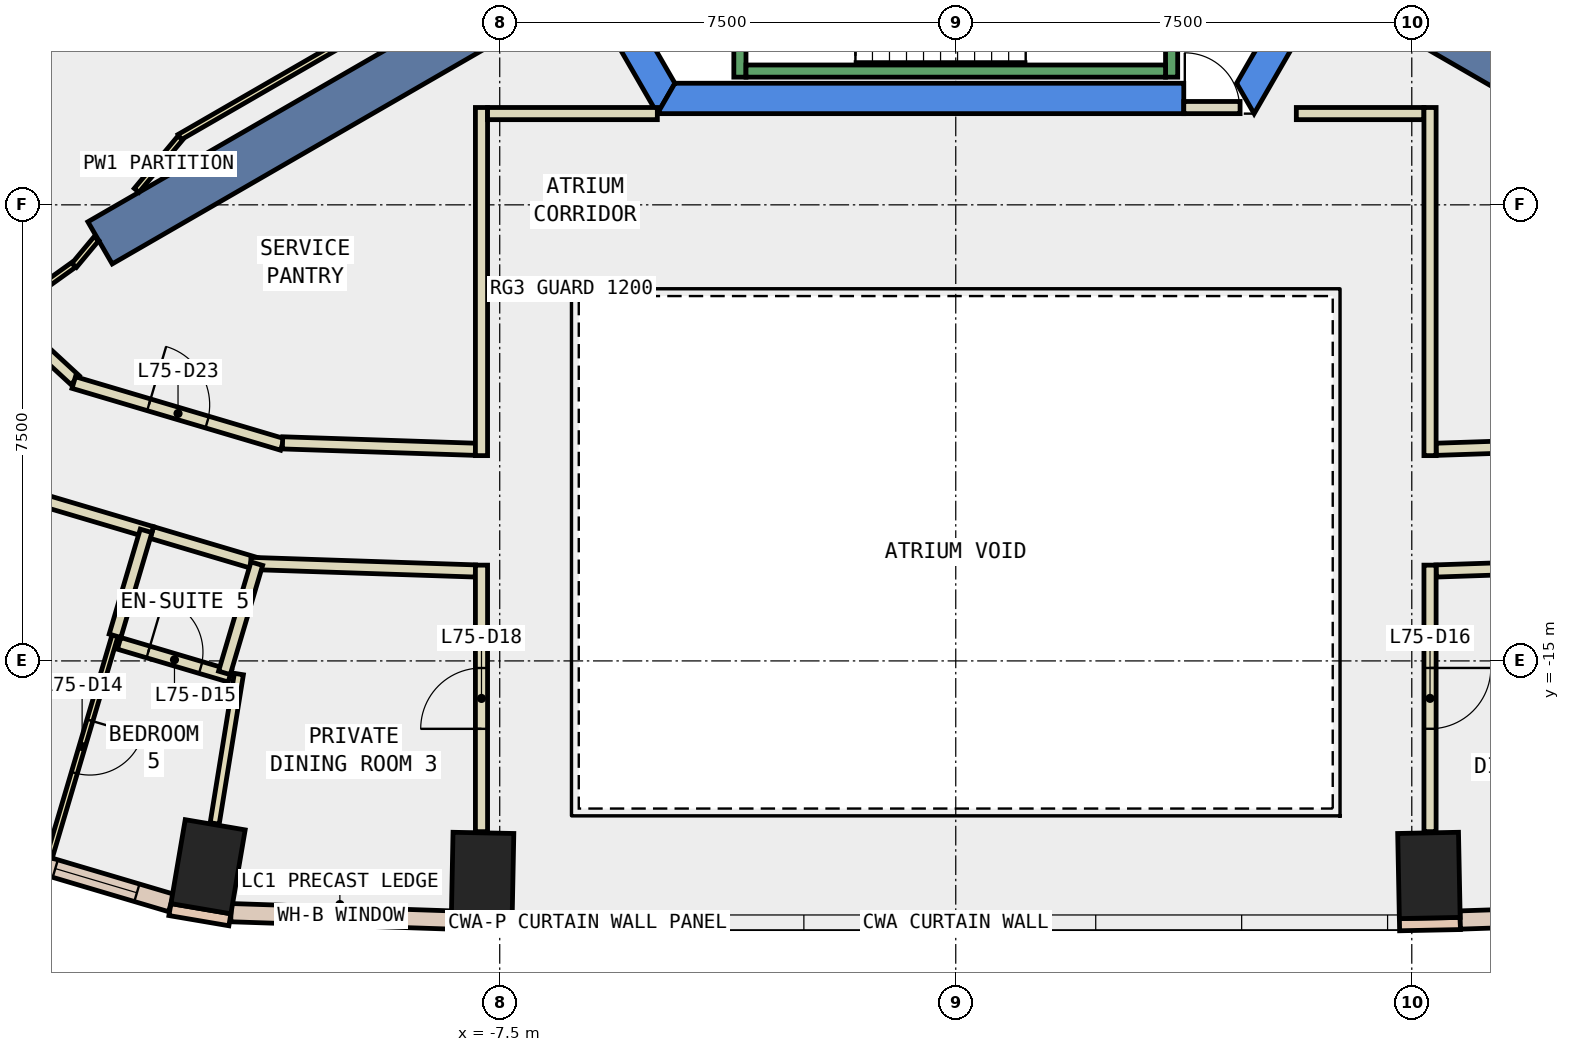
"""IFC4 building model, lengths in metres.
Left out: names, types, materials, properties, quantities, classifications, styles, units other than length and angle.
Written with IfcOpenShell. Run it as: python <this file> out.ifc"""

import sys

from ifc_helpers import new_model, si_unit, direction, frame, frame_2d, origin, origin_2d, place, context, subcontext, project, spatial, polyline, rectangle, outline, extrude, element, fill, save


model = new_model("IFC4")
c1 = context("Model", 3, precision=1e-05, world=origin(), true_north=direction((0.0, 1.0)))
c2 = subcontext(c1, "Body", "Model", "MODEL_VIEW")
j1 = project(units=[si_unit("LENGTHUNIT", "METRE"), si_unit("PLANEANGLEUNIT", "RADIAN")], contexts=[c1])
p1 = place(None, origin())
s1 = spatial("IfcSite", under=j1, at=p1, CompositionType="ELEMENT")
p2 = place(p1, origin())
s2 = spatial("IfcBuilding", under=s1, at=p2, CompositionType="ELEMENT")
p3 = place(p2, frame((0.0, 0.0, 318.8)))
s3 = spatial("IfcBuildingStorey", under=s2, at=p3, CompositionType="ELEMENT", Elevation=318.8)
for number, where, z_axis, x_axis in (
    (1, (-12.297, -18.385, -0.34), (0.0, 0.0, 1.0), (-0.986, 0.168, 0.0)),
    (2, (-7.782, -18.528, -0.34), (0.0, 0.0, 1.0), (-1.0, 0.02, 0.0)),
    (3, (7.782, -18.528, -0.34), (0.0, 0.0, 1.0), (1.0, 0.02, 0.0)),
):
    element("IfcColumn", number, at=place(p3, frame(where, z_axis=z_axis, x_axis=x_axis)), inside=s3, PredefinedType="COLUMN", context=c2, shape_type="SweptSolid", body=[
        extrude(rectangle(XDim=1.0, YDim=1.4, at=origin_2d()), origin(), (0.0, 0.0, 1.0), 3.6),
    ])
p4 = place(p3, frame((0.0, 0.0, -0.34)))
e4 = element("IfcWall", 4, at=p4, inside=s3, PredefinedType="SHEAR", context=c2, shape_type="SweptSolid", body=[
    extrude(outline(polyline([(-9.815, 2.5), (-4.907, -6.0), (-4.619, -5.5), (-9.238, 2.5), (-9.815, 2.5)])), origin(), (0.0, 0.0, 1.0), 3.6),
])
p5 = place(p3, frame((0.0, 0.0, -0.34)))
e5 = element("IfcWall", 5, at=p5, inside=s3, PredefinedType="SHEAR", context=c2, shape_type="SweptSolid", body=[
    extrude(outline(polyline([(3.75, -6.0), (3.75, -5.5), (-4.619, -5.5), (-4.907, -6.0), (3.75, -6.0)])), origin(), (0.0, 0.0, 1.0), 3.6),
])
p6 = place(p3, frame((0.0, 0.0, -0.34)))
e6 = element("IfcWall", 6, at=p6, inside=s3, PredefinedType="SHEAR", context=c2, shape_type="SweptSolid", body=[
    extrude(outline(polyline([(4.907, -6.0), (9.815, 2.5), (9.238, 2.5), (4.619, -5.5), (4.907, -6.0)])), origin(), (0.0, 0.0, 1.0), 3.6),
])
for number, where, z_axis, x_axis in (
    (7, (6.279, -3.625, -0.34), (0.0, 0.0, 1.0), (0.866, -0.5, 0.0)),
    (8, (-6.279, -3.625, -0.34), (0.0, 0.0, 1.0), (-0.866, -0.5, 0.0)),
):
    element("IfcWall", number, at=place(p3, frame(where, z_axis=z_axis, x_axis=x_axis)), inside=s3, PredefinedType="SHEAR", context=c2, shape_type="SweptSolid", body=[
        extrude(rectangle(XDim=9.0, YDim=0.8, at=frame_2d((4.5, 0.0))), origin(), (0.0, 0.0, 1.0), 3.6),
    ])
for number, where, z_axis, x_axis in (
    (9, (-12.924, -19.089, 0.0), (0.0, 0.0, 1.0), (0.986, -0.168, 0.0)),
    (10, (-8.298, -19.318, 0.0), (0.0, 0.0, 1.0), (1.0, -0.02, 0.0)),
    (11, (7.298, -19.338, 0.0), (0.0, 0.0, 1.0), (1.0, 0.02, 0.0)),
):
    element("IfcWall", number, at=place(p3, frame(where, z_axis=z_axis, x_axis=x_axis)), inside=s3, PredefinedType="STANDARD", context=c2, shape_type="SweptSolid", body=[
        extrude(rectangle(XDim=1.0, YDim=0.2, at=frame_2d((0.5, 0.0))), origin(), (0.0, 0.0, 1.0), 3.26),
    ])
p7 = place(p3, frame((-11.919, -19.14, 0.0), z_axis=(0.0, 0.0, 1.0), x_axis=(0.999441913039, -0.033404527552, 0.0)))
e12 = element("IfcWall", 12, at=p7, inside=s3, PredefinedType="STANDARD", context=c2, shape_type="SweptSolid", body=[
    extrude(rectangle(XDim=3.625, YDim=0.3, at=frame_2d((1.812, 0.0))), origin(), (0.0, 0.0, 1.0), 3.26),
])
p8 = place(p7, frame((1.113, 0.0, 0.9)))
e13 = element("IfcOpeningElement", 13, at=p8, cuts=e12, PredefinedType="OPENING", context=c2, shape_type="SweptSolid", body=[
    extrude(rectangle(XDim=1.4, YDim=2.0, at=frame_2d((0.7, 1.0))), frame((0.0, 0.16, 0.0), z_axis=(0.0, -1.0, 0.0), x_axis=(1.0, 0.0, 0.0)), (0.0, 0.0, 1.0), 0.32),
])
p9 = place(p3, frame((8.296, -19.261, 0.0), z_axis=(0.0, 0.0, 1.0), x_axis=(0.999441913039, 0.033404527552, 0.0)))
e14 = element("IfcWall", 14, at=p9, inside=s3, PredefinedType="STANDARD", context=c2, shape_type="SweptSolid", body=[
    extrude(rectangle(XDim=3.625, YDim=0.3, at=frame_2d((1.812, 0.0))), origin(), (0.0, 0.0, 1.0), 3.26),
])
p10 = place(p9, frame((1.113, 0.0, 0.9)))
e15 = element("IfcOpeningElement", 15, at=p10, cuts=e14, PredefinedType="OPENING", context=c2, shape_type="SweptSolid", body=[
    extrude(rectangle(XDim=1.4, YDim=2.0, at=frame_2d((0.7, 1.0))), frame((0.0, 0.16, 0.0), z_axis=(0.0, -1.0, 0.0), x_axis=(1.0, 0.0, 0.0)), (0.0, 0.0, 1.0), 0.32),
])
p11 = place(p3, frame((-17.842, -17.516, 0.0), z_axis=(0.0, 0.0, 1.0), x_axis=(0.958757933751, -0.284223898486, 0.0)))
e16 = element("IfcWall", 16, at=p11, inside=s3, PredefinedType="STANDARD", context=c2, shape_type="SweptSolid", body=[
    extrude(rectangle(XDim=5.15, YDim=0.3, at=frame_2d((2.575, 0.0))), origin(), (0.0, 0.0, 1.0), 3.26),
])
p12 = place(p11, frame((0.588, 0.0, 0.9)))
e17 = element("IfcOpeningElement", 17, at=p12, cuts=e16, PredefinedType="OPENING", context=c2, shape_type="SweptSolid", body=[
    extrude(rectangle(XDim=1.4, YDim=2.0, at=frame_2d((0.7, 1.0))), frame((0.0, 0.16, 0.0), z_axis=(0.0, -1.0, 0.0), x_axis=(1.0, 0.0, 0.0)), (0.0, 0.0, 1.0), 0.32),
])
p13 = place(p11, frame((3.163, 0.0, 0.9)))
e18 = element("IfcOpeningElement", 18, at=p13, cuts=e16, PredefinedType="OPENING", context=c2, shape_type="SweptSolid", body=[
    extrude(rectangle(XDim=1.4, YDim=2.0, at=frame_2d((0.7, 1.0))), frame((0.0, 0.16, 0.0), z_axis=(0.0, -1.0, 0.0), x_axis=(1.0, 0.0, 0.0)), (0.0, 0.0, 1.0), 0.32),
])
p14 = place(p3, frame((7.9, -11.52, 0.0), z_axis=(0.0, 0.0, 1.0), x_axis=(0.999442599499, 0.033383982774, 0.0)))
e19 = element("IfcWall", 19, at=p14, inside=s3, PredefinedType="PARTITIONING", context=c2, shape_type="SweptSolid", body=[
    extrude(rectangle(XDim=3.174, YDim=0.2, at=frame_2d((1.587, 0.0))), origin(), (0.0, 0.0, 1.0), 3.26),
])
p15 = place(p3, frame((-11.489, 1.942, 0.0), z_axis=(0.0, 0.0, 1.0), x_axis=(-0.475643534049, -0.879638123615, 0.0)))
e20 = element("IfcWall", 20, at=p15, inside=s3, PredefinedType="PARTITIONING", context=c2, shape_type="SweptSolid", body=[
    extrude(rectangle(XDim=7.871, YDim=0.2, at=frame_2d((3.936, 0.0))), origin(), (0.0, 0.0, 1.0), 3.26),
])
p16 = place(p15, frame((3.436, 0.0, 0.0)))
e21 = element("IfcOpeningElement", 21, at=p16, cuts=e20, PredefinedType="OPENING", context=c2, shape_type="SweptSolid", body=[
    extrude(rectangle(XDim=1.0, YDim=2.1, at=frame_2d((0.5, 1.05))), frame((0.0, 0.11, 0.0), z_axis=(0.0, -1.0, 0.0), x_axis=(1.0, 0.0, 0.0)), (0.0, 0.0, 1.0), 0.22),
])
p17 = place(p3, frame((-15.687, -9.272, 0.0), z_axis=(0.0, 0.0, 1.0), x_axis=(0.734946370973, -0.67812523312, 0.0)))
e22 = element("IfcWall", 22, at=p17, inside=s3, PredefinedType="PARTITIONING", context=c2, shape_type="SweptSolid", body=[
    extrude(rectangle(XDim=1.637, YDim=0.2, at=frame_2d((0.818, 0.0))), origin(), (0.0, 0.0, 1.0), 3.26),
])
p18 = place(p3, frame((-14.506, -10.422, 0.0), z_axis=(0.0, 0.0, 1.0), x_axis=(0.958760241353, -0.284216114252, 0.0)))
e23 = element("IfcWall", 23, at=p18, inside=s3, PredefinedType="PARTITIONING", context=c2, shape_type="SweptSolid", body=[
    extrude(rectangle(XDim=3.578, YDim=0.2, at=frame_2d((1.789, 0.0))), origin(), (0.0, 0.0, 1.0), 3.26),
])
p19 = place(p18, frame((1.289, 0.0, 0.0)))
e24 = element("IfcOpeningElement", 24, at=p19, cuts=e23, PredefinedType="OPENING", context=c2, shape_type="SweptSolid", body=[
    extrude(rectangle(XDim=1.0, YDim=2.1, at=frame_2d((0.5, 1.05))), frame((0.0, 0.11, 0.0), z_axis=(0.0, -1.0, 0.0), x_axis=(1.0, 0.0, 0.0)), (0.0, 0.0, 1.0), 0.22),
])
p20 = place(p3, frame((-11.072, -11.414, 0.0), z_axis=(0.0, 0.0, 1.0), x_axis=(0.999442599499, -0.033383982774, 0.0)))
e25 = element("IfcWall", 25, at=p20, inside=s3, PredefinedType="PARTITIONING", context=c2, shape_type="SweptSolid", body=[
    extrude(rectangle(XDim=3.174, YDim=0.2, at=frame_2d((1.587, 0.0))), origin(), (0.0, 0.0, 1.0), 3.26),
])
p21 = place(p3, frame((11.52, -13.4, 0.0), z_axis=(0.0, 0.0, 1.0), x_axis=(-0.999441010134, -0.033431530957, 0.0)))
e26 = element("IfcWall", 26, at=p21, inside=s3, PredefinedType="PARTITIONING", context=c2, shape_type="SweptSolid", body=[
    extrude(rectangle(XDim=3.622, YDim=0.2, at=frame_2d((1.811, 0.0))), origin(), (0.0, 0.0, 1.0), 3.26),
])
p22 = place(p3, frame((-13.22, -12.889, 0.0), z_axis=(0.0, 0.0, 1.0), x_axis=(-0.958789155152, 0.284118559693, 0.0)))
e27 = element("IfcWall", 27, at=p22, inside=s3, PredefinedType="PARTITIONING", context=c2, shape_type="SweptSolid", body=[
    extrude(rectangle(XDim=2.2, YDim=0.2, at=frame_2d((1.1, 0.0))), origin(), (0.0, 0.0, 1.0), 3.26),
])
p23 = place(p3, frame((-11.495, -13.401, 0.0), z_axis=(0.0, 0.0, 1.0), x_axis=(-0.958662482938, 0.284545679649, 0.0)))
e28 = element("IfcWall", 28, at=p23, inside=s3, PredefinedType="PARTITIONING", context=c2, shape_type="SweptSolid", body=[
    extrude(rectangle(XDim=1.799, YDim=0.2, at=frame_2d((0.9, 0.0))), origin(), (0.0, 0.0, 1.0), 3.26),
])
p24 = place(p3, frame((-7.9, -13.521, 0.0), z_axis=(0.0, 0.0, 1.0), x_axis=(-0.999437184802, 0.033545694739, 0.0)))
e29 = element("IfcWall", 29, at=p24, inside=s3, PredefinedType="PARTITIONING", context=c2, shape_type="SweptSolid", body=[
    extrude(rectangle(XDim=3.697, YDim=0.2, at=frame_2d((1.849, 0.0))), origin(), (0.0, 0.0, 1.0), 3.26),
])
p25 = place(p3, frame((5.601, -5.999, 0.0), z_axis=(0.0, 0.0, 1.0), x_axis=(1.0, 0.0, 0.0)))
e30 = element("IfcWall", 30, at=p25, inside=s3, PredefinedType="PARTITIONING", context=c2, shape_type="SweptSolid", body=[
    extrude(rectangle(XDim=2.099, YDim=0.2, at=frame_2d((1.049, 0.0))), origin(), (0.0, 0.0, 1.0), 3.26),
])
for number, where, z_axis, x_axis in (
    (31, (7.8, -5.899, 0.0), (0.0, 0.0, 1.0), (0.0, -1.0, 0.0)),
    (32, (-7.8, -11.624, 0.0), (0.0, 0.0, 1.0), (0.0, 1.0, 0.0)),
):
    element("IfcWall", number, at=place(p3, frame(where, z_axis=z_axis, x_axis=x_axis)), inside=s3, PredefinedType="PARTITIONING", context=c2, shape_type="SweptSolid", body=[
        extrude(rectangle(XDim=5.725, YDim=0.2, at=frame_2d((2.863, 0.0))), origin(), (0.0, 0.0, 1.0), 3.26),
    ])
p26 = place(p3, frame((-7.7, -5.999, 0.0), z_axis=(0.0, 0.0, 1.0), x_axis=(1.0, 0.0, 0.0)))
e33 = element("IfcWall", 33, at=p26, inside=s3, PredefinedType="PARTITIONING", context=c2, shape_type="SweptSolid", body=[
    extrude(rectangle(XDim=2.792, YDim=0.2, at=frame_2d((1.396, 0.0))), origin(), (0.0, 0.0, 1.0), 3.26),
])
p27 = place(p3, frame((7.8, -13.425, 0.0), z_axis=(0.0, 0.0, 1.0), x_axis=(0.0, -1.0, 0.0)))
e34 = element("IfcWall", 34, at=p27, inside=s3, PredefinedType="PARTITIONING", context=c2, shape_type="SweptSolid", body=[
    extrude(rectangle(XDim=4.383, YDim=0.2, at=frame_2d((2.191, 0.0))), origin(), (0.0, 0.0, 1.0), 3.26),
])
p28 = place(p27, frame((1.691, 0.0, 0.0)))
e35 = element("IfcOpeningElement", 35, at=p28, cuts=e34, PredefinedType="OPENING", context=c2, shape_type="SweptSolid", body=[
    extrude(rectangle(XDim=1.0, YDim=2.1, at=frame_2d((0.5, 1.05))), frame((0.0, 0.11, 0.0), z_axis=(0.0, -1.0, 0.0), x_axis=(1.0, 0.0, 0.0)), (0.0, 0.0, 1.0), 0.22),
])
p29 = place(p3, frame((-7.8, -17.808, 0.0), z_axis=(0.0, 0.0, 1.0), x_axis=(0.0, 1.0, 0.0)))
e36 = element("IfcWall", 36, at=p29, inside=s3, PredefinedType="PARTITIONING", context=c2, shape_type="SweptSolid", body=[
    extrude(rectangle(XDim=4.383, YDim=0.2, at=frame_2d((2.191, 0.0))), origin(), (0.0, 0.0, 1.0), 3.26),
])
p30 = place(p29, frame((1.691, 0.0, 0.0)))
e37 = element("IfcOpeningElement", 37, at=p30, cuts=e36, PredefinedType="OPENING", context=c2, shape_type="SweptSolid", body=[
    extrude(rectangle(XDim=1.0, YDim=2.1, at=frame_2d((0.5, 1.05))), frame((0.0, 0.11, 0.0), z_axis=(0.0, -1.0, 0.0), x_axis=(1.0, 0.0, 0.0)), (0.0, 0.0, 1.0), 0.22),
])
p31 = place(p3, frame((-6.705, -2.887, 0.0), z_axis=(0.0, 0.0, 1.0), x_axis=(-0.866001397039, -0.500041578597, 0.0)))
e38 = element("IfcWall", 38, at=p31, inside=s3, PredefinedType="PARTITIONING", context=c2, shape_type="SweptSolid", body=[
    extrude(rectangle(XDim=6.998, YDim=0.1, at=frame_2d((3.499, 0.0))), origin(), (0.0, 0.0, 1.0), 3.26),
])
p32 = place(p3, frame((-12.753, -6.399, 0.0), z_axis=(0.0, 0.0, 1.0), x_axis=(-0.640077503072, -0.768310347491, 0.0)))
e39 = element("IfcWall", 39, at=p32, inside=s3, PredefinedType="PARTITIONING", context=c2, shape_type="SweptSolid", body=[
    extrude(rectangle(XDim=1.123, YDim=0.1, at=frame_2d((0.562, 0.0))), origin(), (0.0, 0.0, 1.0), 3.26),
])
p33 = place(p3, frame((-14.507, -8.486, 0.0), z_axis=(0.0, 0.0, 1.0), x_axis=(-0.812782900134, -0.582566697684, 0.0)))
e40 = element("IfcWall", 40, at=p33, inside=s3, PredefinedType="PARTITIONING", context=c2, shape_type="SweptSolid", body=[
    extrude(rectangle(XDim=1.407, YDim=0.1, at=frame_2d((0.704, 0.0))), origin(), (0.0, 0.0, 1.0), 3.26),
])
p34 = place(p3, frame((-13.828, -14.587, 0.0), z_axis=(0.0, 0.0, 1.0), x_axis=(-0.284245833657, -0.958751430794, 0.0)))
e41 = element("IfcWall", 41, at=p34, inside=s3, PredefinedType="PARTITIONING", context=c2, shape_type="SweptSolid", body=[
    extrude(rectangle(XDim=3.8, YDim=0.1, at=frame_2d((1.9, 0.0))), origin(), (0.0, 0.0, 1.0), 3.26),
])
p35 = place(p34, frame((1.45, 0.0, 0.0)))
e42 = element("IfcOpeningElement", 42, at=p35, cuts=e41, PredefinedType="OPENING", context=c2, shape_type="SweptSolid", body=[
    extrude(rectangle(XDim=0.9, YDim=2.1, at=frame_2d((0.45, 1.05))), frame((0.0, 0.06, 0.0), z_axis=(0.0, -1.0, 0.0), x_axis=(1.0, 0.0, 0.0)), (0.0, 0.0, 1.0), 0.12),
])
p36 = place(p3, frame((-13.316, -12.861, 0.0), z_axis=(0.0, 0.0, 1.0), x_axis=(-0.283898972531, -0.958854198195, 0.0)))
e43 = element("IfcWall", 43, at=p36, inside=s3, PredefinedType="PARTITIONING", context=c2, shape_type="SweptSolid", body=[
    extrude(rectangle(XDim=1.8, YDim=0.2, at=frame_2d((0.9, 0.0))), origin(), (0.0, 0.0, 1.0), 3.26),
])
p37 = place(p3, frame((-13.76, -14.711, 0.0), z_axis=(0.0, 0.0, 1.0), x_axis=(0.958772187895, -0.284175811285, 0.0)))
e44 = element("IfcWall", 44, at=p37, inside=s3, PredefinedType="PARTITIONING", context=c2, shape_type="SweptSolid", body=[
    extrude(rectangle(XDim=1.9, YDim=0.2, at=frame_2d((0.95, 0.0))), origin(), (0.0, 0.0, 1.0), 3.26),
])
p38 = place(p37, frame((0.5, 0.0, 0.0)))
e45 = element("IfcOpeningElement", 45, at=p38, cuts=e44, PredefinedType="OPENING", context=c2, shape_type="SweptSolid", body=[
    extrude(rectangle(XDim=0.9, YDim=2.1, at=frame_2d((0.45, 1.05))), frame((0.0, 0.11, 0.0), z_axis=(0.0, -1.0, 0.0), x_axis=(1.0, 0.0, 0.0)), (0.0, 0.0, 1.0), 0.22),
])
p39 = place(p3, frame((-11.79, -15.216, 0.0), z_axis=(0.0, 0.0, 1.0), x_axis=(-0.159880010227, -0.98713645578, 0.0)))
e46 = element("IfcWall", 46, at=p39, inside=s3, PredefinedType="PARTITIONING", context=c2, shape_type="SweptSolid", body=[
    extrude(rectangle(XDim=2.489, YDim=0.15, at=frame_2d((1.245, 0.0))), origin(), (0.0, 0.0, 1.0), 3.26),
])
p40 = place(p3, frame((-11.495, -13.401, 0.0), z_axis=(0.0, 0.0, 1.0), x_axis=(-0.284465432667, -0.958686297815, 0.0)))
e47 = element("IfcWall", 47, at=p40, inside=s3, PredefinedType="PARTITIONING", context=c2, shape_type="SweptSolid", body=[
    extrude(rectangle(XDim=1.874, YDim=0.2, at=frame_2d((0.937, 0.0))), origin(), (0.0, 0.0, 1.0), 3.26),
])
p41 = place(p3, frame((3.75, -5.9, 0.0), z_axis=(0.0, 0.0, 1.0), x_axis=(1.0, 0.0, 0.0)))
e48 = element("IfcWall", 48, at=p41, inside=s3, PredefinedType="PARTITIONING", context=c2, shape_type="SweptSolid", body=[
    extrude(rectangle(XDim=0.926, YDim=0.2, at=frame_2d((0.463, 0.0))), origin(), (0.0, 0.0, 1.0), 2.4),
])
p42 = place(p41, frame((0.017, 0.0, 0.0)))
e49 = element("IfcOpeningElement", 49, at=p42, cuts=e48, PredefinedType="OPENING", context=c2, shape_type="SweptSolid", body=[
    extrude(rectangle(XDim=0.9, YDim=2.1, at=frame_2d((0.45, 1.05))), frame((0.0, 0.11, 0.0), z_axis=(0.0, -1.0, 0.0), x_axis=(1.0, 0.0, 0.0)), (0.0, 0.0, 1.0), 0.22),
])
p43 = place(p3, frame((-14.133, -8.056, 0.0), z_axis=(0.0, 0.0, 1.0), x_axis=(-0.640142394154, -0.768256282244, 0.0)))
e50 = element("IfcWall", 50, at=p43, inside=s3, PredefinedType="PARTITIONING", context=c2, shape_type="SweptSolid", body=[
    extrude(rectangle(XDim=0.572, YDim=0.1, at=frame_2d((0.286, 0.0))), origin(), (0.0, 0.0, 1.0), 3.26),
])
p44 = place(p3, frame((-3.55, -1.0, 0.0), z_axis=(0.0, 0.0, 1.0), x_axis=(0.0, -1.0, 0.0)))
e51 = element("IfcWall", 51, at=p44, inside=s3, PredefinedType="STANDARD", context=c2, shape_type="SweptSolid", body=[
    extrude(rectangle(XDim=4.4, YDim=0.2, at=frame_2d((2.2, 0.0))), origin(), (0.0, 0.0, 1.0), 3.26),
])
p45 = place(p44, frame((2.4, 0.0, 0.0)))
e52 = element("IfcOpeningElement", 52, at=p45, cuts=e51, PredefinedType="OPENING", context=c2, shape_type="SweptSolid", body=[
    extrude(rectangle(XDim=1.1, YDim=2.2, at=frame_2d((0.55, 1.1))), frame((0.0, 0.11, 0.0), z_axis=(0.0, -1.0, 0.0), x_axis=(1.0, 0.0, 0.0)), (0.0, 0.0, 1.0), 0.22),
])
p46 = place(p3, frame((3.55, -2.667, 0.0), z_axis=(0.0, 0.0, 1.0), x_axis=(0.0, -1.0, 0.0)))
e53 = element("IfcWall", 53, at=p46, inside=s3, PredefinedType="STANDARD", context=c2, shape_type="SweptSolid", body=[
    extrude(rectangle(XDim=2.733, YDim=0.2, at=frame_2d((1.366, 0.0))), origin(), (0.0, 0.0, 1.0), 3.26),
])
p47 = place(p3, frame((-3.45, -5.3, 0.0), z_axis=(0.0, 0.0, 1.0), x_axis=(1.0, 0.0, 0.0)))
e54 = element("IfcWall", 54, at=p47, inside=s3, PredefinedType="STANDARD", context=c2, shape_type="SweptSolid", body=[
    extrude(rectangle(XDim=6.9, YDim=0.2, at=frame_2d((3.45, 0.0))), origin(), (0.0, 0.0, 1.0), 3.26),
])
p48 = place(p8, origin())
e55 = element("IfcWindow", 55, at=p48, inside=s3, PartitioningType="SINGLE_PANEL", PredefinedType="WINDOW", context=c2, shape_type="SweptSolid", body=[
    extrude(rectangle(XDim=1.4, YDim=2.0, at=frame_2d((0.7, 1.0))), frame((0.0, 0.03, 0.0), z_axis=(0.0, -1.0, 0.0), x_axis=(1.0, 0.0, 0.0)), (0.0, 0.0, 1.0), 0.06),
])
fill(e13, e55)
p49 = place(p13, origin())
e56 = element("IfcWindow", 56, at=p49, inside=s3, PartitioningType="SINGLE_PANEL", PredefinedType="WINDOW", context=c2, shape_type="SweptSolid", body=[
    extrude(rectangle(XDim=1.4, YDim=2.0, at=frame_2d((0.7, 1.0))), frame((0.0, 0.03, 0.0), z_axis=(0.0, -1.0, 0.0), x_axis=(1.0, 0.0, 0.0)), (0.0, 0.0, 1.0), 0.06),
])
fill(e18, e56)
p50 = place(p35, origin())
e57 = element("IfcDoor", 57, at=p50, inside=s3, OperationType="SINGLE_SWING_RIGHT", PredefinedType="DOOR", context=c2, shape_type="SweptSolid", body=[
    extrude(rectangle(XDim=0.9, YDim=2.1, at=frame_2d((0.45, 1.05))), frame((0.0, 0.025, 0.0), z_axis=(0.0, -1.0, 0.0), x_axis=(1.0, 0.0, 0.0)), (0.0, 0.0, 1.0), 0.05),
])
fill(e42, e57)
p51 = place(p38, origin())
e58 = element("IfcDoor", 58, at=p51, inside=s3, OperationType="SINGLE_SWING_LEFT", PredefinedType="DOOR", context=c2, shape_type="SweptSolid", body=[
    extrude(rectangle(XDim=0.9, YDim=2.1, at=frame_2d((0.45, 1.05))), frame((0.0, 0.025, 0.0), z_axis=(0.0, -1.0, 0.0), x_axis=(1.0, 0.0, 0.0)), (0.0, 0.0, 1.0), 0.05),
])
fill(e45, e58)
p52 = place(p28, origin())
e59 = element("IfcDoor", 59, at=p52, inside=s3, OperationType="SINGLE_SWING_LEFT", PredefinedType="DOOR", context=c2, shape_type="SweptSolid", body=[
    extrude(rectangle(XDim=1.0, YDim=2.1, at=frame_2d((0.5, 1.05))), frame((0.0, 0.025, 0.0), z_axis=(0.0, -1.0, 0.0), x_axis=(1.0, 0.0, 0.0)), (0.0, 0.0, 1.0), 0.05),
])
fill(e35, e59)
p53 = place(p30, origin())
e60 = element("IfcDoor", 60, at=p53, inside=s3, OperationType="SINGLE_SWING_LEFT", PredefinedType="DOOR", context=c2, shape_type="SweptSolid", body=[
    extrude(rectangle(XDim=1.0, YDim=2.1, at=frame_2d((0.5, 1.05))), frame((0.0, 0.025, 0.0), z_axis=(0.0, -1.0, 0.0), x_axis=(1.0, 0.0, 0.0)), (0.0, 0.0, 1.0), 0.05),
])
fill(e37, e60)
p54 = place(p19, origin())
e61 = element("IfcDoor", 61, at=p54, inside=s3, OperationType="SINGLE_SWING_RIGHT", PredefinedType="DOOR", context=c2, shape_type="SweptSolid", body=[
    extrude(rectangle(XDim=1.0, YDim=2.1, at=frame_2d((0.5, 1.05))), frame((0.0, 0.025, 0.0), z_axis=(0.0, -1.0, 0.0), x_axis=(1.0, 0.0, 0.0)), (0.0, 0.0, 1.0), 0.05),
])
fill(e24, e61)
p55 = place(p42, origin())
e62 = element("IfcDoor", 62, at=p55, inside=s3, OperationType="SINGLE_SWING_LEFT", PredefinedType="DOOR", context=c2, shape_type="SweptSolid", body=[
    extrude(rectangle(XDim=0.9, YDim=2.1, at=frame_2d((0.45, 1.05))), frame((0.0, 0.025, 0.0), z_axis=(0.0, -1.0, 0.0), x_axis=(1.0, 0.0, 0.0)), (0.0, 0.0, 1.0), 0.05),
])
fill(e49, e62)
save(model, sys.argv[1])
